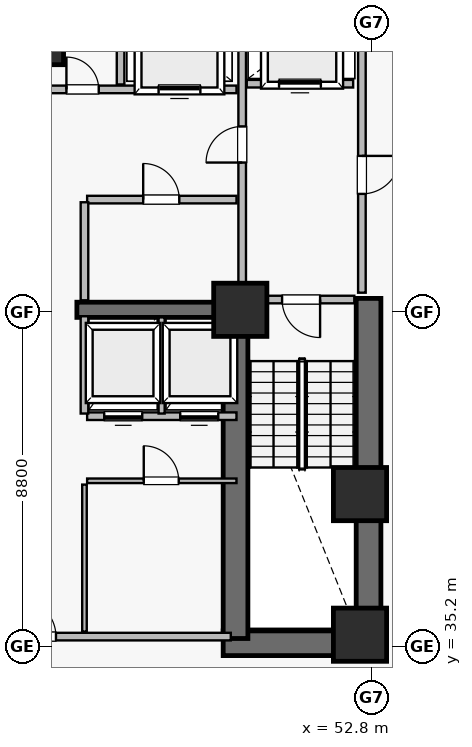
"""IFC4 building model, lengths in metres.
Left out: names, types, materials, properties, quantities, classifications, styles, units other than length and angle.
Written with IfcOpenShell. Run it as: python <this file> out.ifc"""

import sys

from ifc_helpers import new_model, si_unit, direction, frame, frame_2d, origin, origin_2d, place, context, subcontext, project, spatial, rectangle, extrude, element, fill, save


model = new_model("IFC4")
c1 = context("Model", 3, precision=1e-05, world=origin(), true_north=direction((0.0, 1.0)))
c2 = subcontext(c1, "Body", "Model", "MODEL_VIEW")
j1 = project(units=[si_unit("LENGTHUNIT", "METRE"), si_unit("PLANEANGLEUNIT", "RADIAN")], contexts=[c1])
p1 = place(None, origin())
s1 = spatial("IfcSite", under=j1, at=p1, CompositionType="ELEMENT")
p2 = place(p1, origin())
s2 = spatial("IfcBuilding", under=s1, at=p2, CompositionType="ELEMENT")
p3 = place(p2, frame((0.0, 0.0, -11.7)))
s3 = spatial("IfcBuildingStorey", under=s2, at=p3, CompositionType="ELEMENT", Elevation=-11.7)
p4 = place(p3, frame((48.9, 35.275, 0.0), z_axis=(0.0, 0.0, 1.0), x_axis=(1.0, 0.0, 0.0)))
e1 = element("IfcWall", 1, at=p4, inside=s3, PredefinedType="SHEAR", context=c2, shape_type="SweptSolid", body=[
    extrude(rectangle(XDim=4.15, YDim=0.65, at=frame_2d((2.075, 0.0))), origin(), (0.0, 0.0, 1.0), 3.58),
])
p5 = place(p3, frame((52.725, 34.95, 0.0), z_axis=(0.0, 0.0, 1.0), x_axis=(0.0, 1.0, 0.0)))
e2 = element("IfcWall", 2, at=p5, inside=s3, PredefinedType="SHEAR", context=c2, shape_type="SweptSolid", body=[
    extrude(rectangle(XDim=9.4, YDim=0.65, at=frame_2d((4.7, 0.0))), origin(), (0.0, 0.0, 1.0), 3.58),
])
p6 = place(p3, frame((49.225, 35.4, 0.0), z_axis=(0.0, 0.0, 1.0), x_axis=(0.0, 1.0, 0.0)))
e3 = element("IfcWall", 3, at=p6, inside=s3, PredefinedType="SHEAR", context=c2, shape_type="SweptSolid", body=[
    extrude(rectangle(XDim=8.95, YDim=0.65, at=frame_2d((4.475, 0.0))), origin(), (0.0, 0.0, 1.0), 3.58),
])
p7 = place(p3, frame((45.05, 44.05, 0.0), z_axis=(0.0, 0.0, 1.0), x_axis=(1.0, 0.0, 0.0)))
e4 = element("IfcWall", 4, at=p7, inside=s3, PredefinedType="SHEAR", context=c2, shape_type="SweptSolid", body=[
    extrude(rectangle(XDim=4.2, YDim=0.4, at=frame_2d((2.1, 0.0))), origin(), (0.0, 0.0, 1.0), 3.58),
])
for number, where, z_axis, x_axis in (
    (5, (52.5, 35.5, 0.0), (0.0, 0.0, 1.0), (1.0, 0.0, 0.0)),
    (6, (52.5, 39.2, 0.0), (0.0, 0.0, 1.0), (1.0, 0.0, 0.0)),
    (7, (49.35, 44.05, 0.0), (0.0, 0.0, 1.0), (1.0, 0.0, 0.0)),
    (8, (44.0, 51.2, 0.0), (0.0, 0.0, 1.0), (1.0, 0.0, 0.0)),
):
    element("IfcColumn", number, at=place(p3, frame(where, z_axis=z_axis, x_axis=x_axis)), inside=s3, PredefinedType="COLUMN", context=c2, shape_type="SweptSolid", body=[
        extrude(rectangle(XDim=1.4, YDim=1.4, at=origin_2d()), origin(), (0.0, 0.0, 1.0), 3.9),
    ])
p8 = place(p3, frame((38.9, 35.45, 0.0), z_axis=(0.0, 0.0, 1.0), x_axis=(1.0, 0.0, 0.0)))
e9 = element("IfcWall", 9, at=p8, inside=s3, PredefinedType="SOLIDWALL", context=c2, shape_type="SweptSolid", body=[
    extrude(rectangle(XDim=10.2, YDim=0.2, at=frame_2d((5.1, 0.0))), origin(), (0.0, 0.0, 1.0), 3.58),
])
p9 = place(p8, frame((4.6, 0.0, 0.0)))
e10 = element("IfcOpeningElement", 10, at=p9, cuts=e9, PredefinedType="OPENING", context=c2, shape_type="SweptSolid", body=[
    extrude(rectangle(XDim=1.0, YDim=2.15, at=frame_2d((0.5, 1.075))), frame((0.0, 0.11, 0.0), z_axis=(0.0, -1.0, 0.0), x_axis=(1.0, 0.0, 0.0)), (0.0, 0.0, 1.0), 0.22),
])
p10 = place(p3, frame((52.55, 44.5, 0.0), z_axis=(0.0, 0.0, 1.0), x_axis=(0.0, 1.0, 0.0)))
e11 = element("IfcWall", 11, at=p10, inside=s3, PredefinedType="SOLIDWALL", context=c2, shape_type="SweptSolid", body=[
    extrude(rectangle(XDim=7.92, YDim=0.2, at=frame_2d((3.96, 0.0))), origin(), (0.0, 0.0, 1.0), 3.58),
])
p11 = place(p10, frame((2.6, 0.0, 0.0)))
e12 = element("IfcOpeningElement", 12, at=p11, cuts=e11, PredefinedType="OPENING", context=c2, shape_type="SweptSolid", body=[
    extrude(rectangle(XDim=1.0, YDim=2.15, at=frame_2d((0.5, 1.075))), frame((0.0, 0.11, 0.0), z_axis=(0.0, -1.0, 0.0), x_axis=(1.0, 0.0, 0.0)), (0.0, 0.0, 1.0), 0.22),
])
p12 = place(p3, frame((49.4, 44.5, 0.0), z_axis=(0.0, 0.0, 1.0), x_axis=(0.0, 1.0, 0.0)))
e13 = element("IfcWall", 13, at=p12, inside=s3, PredefinedType="SOLIDWALL", context=c2, shape_type="SweptSolid", body=[
    extrude(rectangle(XDim=7.92, YDim=0.2, at=frame_2d((3.96, 0.0))), origin(), (0.0, 0.0, 1.0), 3.58),
])
p13 = place(p12, frame((3.425, 0.0, 0.0)))
e14 = element("IfcOpeningElement", 14, at=p13, cuts=e13, PredefinedType="OPENING", context=c2, shape_type="SweptSolid", body=[
    extrude(rectangle(XDim=0.95, YDim=2.15, at=frame_2d((0.475, 1.075))), frame((0.0, 0.11, 0.0), z_axis=(0.0, -1.0, 0.0), x_axis=(1.0, 0.0, 0.0)), (0.0, 0.0, 1.0), 0.22),
])
p14 = place(p3, frame((44.25, 49.85, 0.0), z_axis=(0.0, 0.0, 1.0), x_axis=(1.0, 0.0, 0.0)))
e15 = element("IfcWall", 15, at=p14, inside=s3, PredefinedType="SOLIDWALL", context=c2, shape_type="SweptSolid", body=[
    extrude(rectangle(XDim=5.0, YDim=0.2, at=frame_2d((2.5, 0.0))), origin(), (0.0, 0.0, 1.0), 2.918),
])
p15 = place(p14, frame((0.525, 0.0, 0.0)))
e16 = element("IfcOpeningElement", 16, at=p15, cuts=e15, PredefinedType="OPENING", context=c2, shape_type="SweptSolid", body=[
    extrude(rectangle(XDim=0.85, YDim=2.1, at=frame_2d((0.425, 1.05))), frame((0.0, 0.11, 0.0), z_axis=(0.0, -1.0, 0.0), x_axis=(1.0, 0.0, 0.0)), (0.0, 0.0, 1.0), 0.22),
])
p16 = place(p14, frame((2.95, 0.0, 0.0)))
e17 = element("IfcOpeningElement", 17, at=p16, cuts=e15, PredefinedType="OPENING", context=c2, shape_type="SweptSolid", body=[
    extrude(rectangle(XDim=1.1, YDim=2.15, at=frame_2d((0.55, 1.075))), frame((0.0, 0.11, 0.0), z_axis=(0.0, -1.0, 0.0), x_axis=(1.0, 0.0, 0.0)), (0.0, 0.0, 1.0), 0.22),
])
p17 = place(p3, frame((45.32, 46.95, 0.0), z_axis=(0.0, 0.0, 1.0), x_axis=(1.0, 0.0, 0.0)))
e18 = element("IfcWall", 18, at=p17, inside=s3, PredefinedType="SOLIDWALL", context=c2, shape_type="SweptSolid", body=[
    extrude(rectangle(XDim=3.93, YDim=0.2, at=frame_2d((1.965, 0.0))), origin(), (0.0, 0.0, 1.0), 2.918),
])
p18 = place(p17, frame((1.475, 0.0, 0.0)))
e19 = element("IfcOpeningElement", 19, at=p18, cuts=e18, PredefinedType="OPENING", context=c2, shape_type="SweptSolid", body=[
    extrude(rectangle(XDim=0.95, YDim=2.15, at=frame_2d((0.475, 1.075))), frame((0.0, 0.11, 0.0), z_axis=(0.0, -1.0, 0.0), x_axis=(1.0, 0.0, 0.0)), (0.0, 0.0, 1.0), 0.22),
])
p19 = place(p3, frame((45.32, 41.25, 0.0), z_axis=(0.0, 0.0, 1.0), x_axis=(1.0, 0.0, 0.0)))
e20 = element("IfcWall", 20, at=p19, inside=s3, PredefinedType="SOLIDWALL", context=c2, shape_type="SweptSolid", body=[
    extrude(rectangle(XDim=3.93, YDim=0.2, at=frame_2d((1.965, 0.0))), origin(), (0.0, 0.0, 1.0), 3.58),
])
p20 = place(p19, frame((0.45, 0.0, 0.0)))
e21 = element("IfcOpeningElement", 21, at=p20, cuts=e20, PredefinedType="OPENING", context=c2, shape_type="SweptSolid", body=[
    extrude(rectangle(XDim=1.0, YDim=2.15, at=frame_2d((0.5, 1.075))), frame((0.0, 0.11, 0.0), z_axis=(0.0, -1.0, 0.0), x_axis=(1.0, 0.0, 0.0)), (0.0, 0.0, 1.0), 0.22),
])
p21 = place(p19, frame((2.45, 0.0, 0.0)))
e22 = element("IfcOpeningElement", 22, at=p21, cuts=e20, PredefinedType="OPENING", context=c2, shape_type="SweptSolid", body=[
    extrude(rectangle(XDim=1.0, YDim=2.15, at=frame_2d((0.5, 1.075))), frame((0.0, 0.11, 0.0), z_axis=(0.0, -1.0, 0.0), x_axis=(1.0, 0.0, 0.0)), (0.0, 0.0, 1.0), 0.22),
])
p22 = place(p3, frame((45.32, 39.55, 0.0), z_axis=(0.0, 0.0, 1.0), x_axis=(1.0, 0.0, 0.0)))
e23 = element("IfcWall", 23, at=p22, inside=s3, PredefinedType="PARTITIONING", context=c2, shape_type="SweptSolid", body=[
    extrude(rectangle(XDim=3.93, YDim=0.12, at=frame_2d((1.965, 0.0))), origin(), (0.0, 0.0, 1.0), 3.58),
])
p23 = place(p22, frame((1.49, 0.0, 0.0)))
e24 = element("IfcOpeningElement", 24, at=p23, cuts=e23, PredefinedType="OPENING", context=c2, shape_type="SweptSolid", body=[
    extrude(rectangle(XDim=0.92, YDim=2.1, at=frame_2d((0.46, 1.05))), frame((0.0, 0.07, 0.0), z_axis=(0.0, -1.0, 0.0), x_axis=(1.0, 0.0, 0.0)), (0.0, 0.0, 1.0), 0.14),
])
p24 = place(p3, frame((49.55, 44.32, 0.0), z_axis=(0.0, 0.0, 1.0), x_axis=(1.0, 0.0, 0.0)))
e25 = element("IfcWall", 25, at=p24, inside=s3, PredefinedType="SOLIDWALL", context=c2, shape_type="SweptSolid", body=[
    extrude(rectangle(XDim=2.8, YDim=0.2, at=frame_2d((1.4, 0.0))), origin(), (0.0, 0.0, 1.0), 3.58),
])
p25 = place(p24, frame((0.9, 0.0, 0.0)))
e26 = element("IfcOpeningElement", 26, at=p25, cuts=e25, PredefinedType="OPENING", context=c2, shape_type="SweptSolid", body=[
    extrude(rectangle(XDim=1.0, YDim=2.15, at=frame_2d((0.5, 1.075))), frame((0.0, 0.11, 0.0), z_axis=(0.0, -1.0, 0.0), x_axis=(1.0, 0.0, 0.0)), (0.0, 0.0, 1.0), 0.22),
])
p26 = place(p3, frame((49.52, 50.0, 0.0), z_axis=(0.0, 0.0, 1.0), x_axis=(1.0, 0.0, 0.0)))
e27 = element("IfcWall", 27, at=p26, inside=s3, PredefinedType="SOLIDWALL", context=c2, shape_type="SweptSolid", body=[
    extrude(rectangle(XDim=2.8, YDim=0.2, at=frame_2d((1.4, 0.0))), origin(), (0.0, 0.0, 1.0), 3.58),
])
p27 = place(p26, frame((0.85, 0.0, 0.0)))
e28 = element("IfcOpeningElement", 28, at=p27, cuts=e27, PredefinedType="OPENING", context=c2, shape_type="SweptSolid", body=[
    extrude(rectangle(XDim=1.1, YDim=2.15, at=frame_2d((0.55, 1.075))), frame((0.0, 0.11, 0.0), z_axis=(0.0, -1.0, 0.0), x_axis=(1.0, 0.0, 0.0)), (0.0, 0.0, 1.0), 0.22),
])
p28 = place(p3, frame((45.25, 35.58, 0.0), z_axis=(0.0, 0.0, 1.0), x_axis=(0.0, 1.0, 0.0)))
e29 = element("IfcWall", 29, at=p28, inside=s3, PredefinedType="PARTITIONING", context=c2, shape_type="SweptSolid", body=[
    extrude(rectangle(XDim=3.87, YDim=0.12, at=frame_2d((1.935, 0.0))), origin(), (0.0, 0.0, 1.0), 3.58),
])
p29 = place(p3, frame((45.25, 44.3, 0.0), z_axis=(0.0, 0.0, 1.0), x_axis=(0.0, 1.0, 0.0)))
e30 = element("IfcWall", 30, at=p29, inside=s3, PredefinedType="SOLIDWALL", context=c2, shape_type="SweptSolid", body=[
    extrude(rectangle(XDim=2.58, YDim=0.2, at=frame_2d((1.29, 0.0))), origin(), (0.0, 0.0, 1.0), 3.58),
])
p30 = place(p3, frame((45.25, 41.32, 0.0), z_axis=(0.0, 0.0, 1.0), x_axis=(0.0, 1.0, 0.0)))
e31 = element("IfcWall", 31, at=p30, inside=s3, PredefinedType="SOLIDWALL", context=c2, shape_type="SweptSolid", body=[
    extrude(rectangle(XDim=2.56, YDim=0.2, at=frame_2d((1.28, 0.0))), origin(), (0.0, 0.0, 1.0), 3.58),
])
p31 = place(p3, frame((47.28, 41.32, 0.0), z_axis=(0.0, 0.0, 1.0), x_axis=(0.0, 1.0, 0.0)))
e32 = element("IfcWall", 32, at=p31, inside=s3, PredefinedType="SOLIDWALL", context=c2, shape_type="SweptSolid", body=[
    extrude(rectangle(XDim=2.53, YDim=0.16, at=frame_2d((1.265, 0.0))), origin(), (0.0, 0.0, 1.0), 3.58),
])
p32 = place(p3, frame((46.2, 49.98, 0.0), z_axis=(0.0, 0.0, 1.0), x_axis=(0.0, 1.0, 0.0)))
e33 = element("IfcWall", 33, at=p32, inside=s3, PredefinedType="SOLIDWALL", context=c2, shape_type="SweptSolid", body=[
    extrude(rectangle(XDim=2.37, YDim=0.2, at=frame_2d((1.185, 0.0))), origin(), (0.0, 0.0, 1.0), 3.58),
])
p33 = place(p25, frame((1.0, 0.0, 0.0), z_axis=(0.0, 0.0, 1.0), x_axis=(-1.0, 0.0, 0.0)))
e34 = element("IfcDoor", 34, at=p33, inside=s3, OperationType="SINGLE_SWING_RIGHT", PredefinedType="DOOR", context=c2, shape_type="SweptSolid", body=[
    extrude(rectangle(XDim=1.0, YDim=2.15, at=frame_2d((0.5, 1.075))), frame((0.0, 0.025, 0.0), z_axis=(0.0, -1.0, 0.0), x_axis=(1.0, 0.0, 0.0)), (0.0, 0.0, 1.0), 0.05),
])
fill(e26, e34)
p34 = place(p11, frame((1.0, 0.0, 0.0), z_axis=(0.0, 0.0, 1.0), x_axis=(-1.0, 0.0, 0.0)))
e35 = element("IfcDoor", 35, at=p34, inside=s3, OperationType="SINGLE_SWING_RIGHT", PredefinedType="DOOR", context=c2, shape_type="SweptSolid", body=[
    extrude(rectangle(XDim=1.0, YDim=2.15, at=frame_2d((0.5, 1.075))), frame((0.0, 0.025, 0.0), z_axis=(0.0, -1.0, 0.0), x_axis=(1.0, 0.0, 0.0)), (0.0, 0.0, 1.0), 0.05),
])
fill(e12, e35)
p35 = place(p13, origin())
e36 = element("IfcDoor", 36, at=p35, inside=s3, OperationType="SINGLE_SWING_LEFT", PredefinedType="DOOR", context=c2, shape_type="SweptSolid", body=[
    extrude(rectangle(XDim=0.95, YDim=2.15, at=frame_2d((0.475, 1.075))), frame((0.0, 0.025, 0.0), z_axis=(0.0, -1.0, 0.0), x_axis=(1.0, 0.0, 0.0)), (0.0, 0.0, 1.0), 0.05),
])
fill(e14, e36)
p36 = place(p27, origin())
e37 = element("IfcDoor", 37, at=p36, inside=s3, OperationType="SLIDING_TO_LEFT", PredefinedType="DOOR", context=c2, shape_type="SweptSolid", body=[
    extrude(rectangle(XDim=1.1, YDim=2.15, at=frame_2d((0.55, 1.075))), frame((0.0, 0.025, 0.0), z_axis=(0.0, -1.0, 0.0), x_axis=(1.0, 0.0, 0.0)), (0.0, 0.0, 1.0), 0.05),
])
fill(e28, e37)
p37 = place(p9, origin())
e38 = element("IfcDoor", 38, at=p37, inside=s3, OperationType="SINGLE_SWING_LEFT", PredefinedType="DOOR", context=c2, shape_type="SweptSolid", body=[
    extrude(rectangle(XDim=1.0, YDim=2.15, at=frame_2d((0.5, 1.075))), frame((0.0, 0.025, 0.0), z_axis=(0.0, -1.0, 0.0), x_axis=(1.0, 0.0, 0.0)), (0.0, 0.0, 1.0), 0.05),
])
fill(e10, e38)
p38 = place(p15, origin())
e39 = element("IfcDoor", 39, at=p38, inside=s3, OperationType="SINGLE_SWING_LEFT", PredefinedType="DOOR", context=c2, shape_type="SweptSolid", body=[
    extrude(rectangle(XDim=0.85, YDim=2.1, at=frame_2d((0.425, 1.05))), frame((0.0, 0.025, 0.0), z_axis=(0.0, -1.0, 0.0), x_axis=(1.0, 0.0, 0.0)), (0.0, 0.0, 1.0), 0.05),
])
fill(e16, e39)
p39 = place(p16, origin())
e40 = element("IfcDoor", 40, at=p39, inside=s3, OperationType="SLIDING_TO_LEFT", PredefinedType="DOOR", context=c2, shape_type="SweptSolid", body=[
    extrude(rectangle(XDim=1.1, YDim=2.15, at=frame_2d((0.55, 1.075))), frame((0.0, 0.025, 0.0), z_axis=(0.0, -1.0, 0.0), x_axis=(1.0, 0.0, 0.0)), (0.0, 0.0, 1.0), 0.05),
])
fill(e17, e40)
p40 = place(p18, origin())
e41 = element("IfcDoor", 41, at=p40, inside=s3, OperationType="SINGLE_SWING_LEFT", PredefinedType="DOOR", context=c2, shape_type="SweptSolid", body=[
    extrude(rectangle(XDim=0.95, YDim=2.15, at=frame_2d((0.475, 1.075))), frame((0.0, 0.025, 0.0), z_axis=(0.0, -1.0, 0.0), x_axis=(1.0, 0.0, 0.0)), (0.0, 0.0, 1.0), 0.05),
])
fill(e19, e41)
p41 = place(p20, frame((1.0, 0.0, 0.0), z_axis=(0.0, 0.0, 1.0), x_axis=(-1.0, 0.0, 0.0)))
e42 = element("IfcDoor", 42, at=p41, inside=s3, OperationType="SLIDING_TO_LEFT", PredefinedType="DOOR", context=c2, shape_type="SweptSolid", body=[
    extrude(rectangle(XDim=1.0, YDim=2.15, at=frame_2d((0.5, 1.075))), frame((0.0, 0.025, 0.0), z_axis=(0.0, -1.0, 0.0), x_axis=(1.0, 0.0, 0.0)), (0.0, 0.0, 1.0), 0.05),
])
fill(e21, e42)
p42 = place(p21, frame((1.0, 0.0, 0.0), z_axis=(0.0, 0.0, 1.0), x_axis=(-1.0, 0.0, 0.0)))
e43 = element("IfcDoor", 43, at=p42, inside=s3, OperationType="SLIDING_TO_LEFT", PredefinedType="DOOR", context=c2, shape_type="SweptSolid", body=[
    extrude(rectangle(XDim=1.0, YDim=2.15, at=frame_2d((0.5, 1.075))), frame((0.0, 0.025, 0.0), z_axis=(0.0, -1.0, 0.0), x_axis=(1.0, 0.0, 0.0)), (0.0, 0.0, 1.0), 0.05),
])
fill(e22, e43)
p43 = place(p23, origin())
e44 = element("IfcDoor", 44, at=p43, inside=s3, OperationType="SINGLE_SWING_LEFT", PredefinedType="DOOR", context=c2, shape_type="SweptSolid", body=[
    extrude(rectangle(XDim=0.92, YDim=2.1, at=frame_2d((0.46, 1.05))), frame((0.0, 0.025, 0.0), z_axis=(0.0, -1.0, 0.0), x_axis=(1.0, 0.0, 0.0)), (0.0, 0.0, 1.0), 0.05),
])
fill(e24, e44)
save(model, sys.argv[1])
